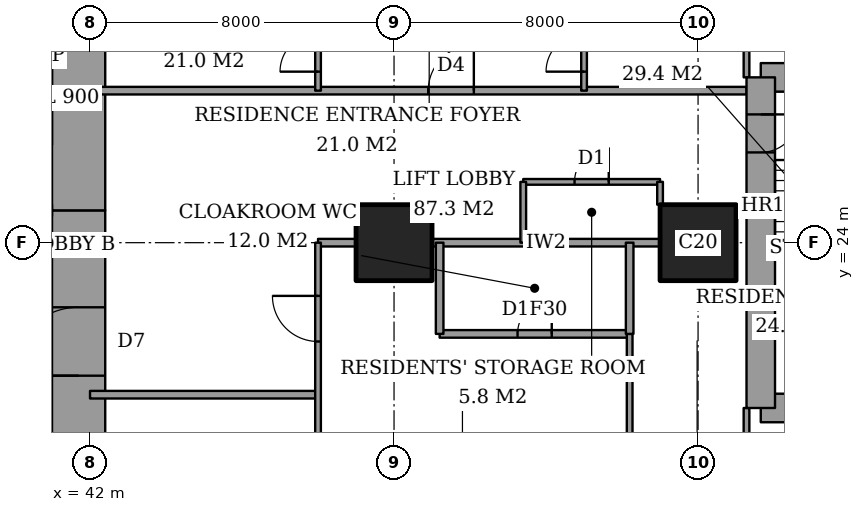
"""IFC4 building model, lengths in metres.
Left out: names, types, materials, properties, quantities, classifications, styles, units other than length and angle.
Written with IfcOpenShell. Run it as: python <this file> out.ifc"""

import sys

from ifc_helpers import new_model, si_unit, direction, frame, frame_2d, origin, origin_2d, place, context, subcontext, project, spatial, rectangle, extrude, element, fill, save


model = new_model("IFC4")
c1 = context("Model", 3, precision=1e-05, world=origin(), true_north=direction((0.0, 1.0)))
c2 = subcontext(c1, "Body", "Model", "MODEL_VIEW")
j1 = project(units=[si_unit("LENGTHUNIT", "METRE"), si_unit("PLANEANGLEUNIT", "RADIAN")], contexts=[c1])
p1 = place(None, origin())
s1 = spatial("IfcSite", under=j1, at=p1, CompositionType="ELEMENT")
p2 = place(p1, origin())
s2 = spatial("IfcBuilding", under=s1, at=p2, CompositionType="ELEMENT")
p3 = place(p2, frame((0.0, 0.0, 103.4)))
s3 = spatial("IfcBuildingStorey", under=s2, at=p3, CompositionType="ELEMENT", Elevation=103.4)
for number, where, z_axis, x_axis in (
    (1, (50.0, 24.0, 0.0), (0.0, 0.0, 1.0), (1.0, 0.0, 0.0)),
    (2, (58.0, 24.0, 0.0), (0.0, 0.0, 1.0), (1.0, 0.0, 0.0)),
):
    element("IfcColumn", number, at=place(p3, frame(where, z_axis=z_axis, x_axis=x_axis)), inside=s3, PredefinedType="COLUMN", context=c2, shape_type="SweptSolid", body=[
        extrude(rectangle(XDim=2.0, YDim=2.0, at=origin_2d()), origin(), (0.0, 0.0, 1.0), 3.6),
    ])
p4 = place(p3, frame((41.7, 13.0, 0.0), z_axis=(0.0, 0.0, 1.0), x_axis=(0.0, 1.0, 0.0)))
e3 = element("IfcWall", 3, at=p4, inside=s3, PredefinedType="SHEAR", context=c2, shape_type="SweptSolid", body=[
    extrude(rectangle(XDim=11.85, YDim=1.4, at=frame_2d((5.925, 0.0))), origin(), (0.0, 0.0, 1.0), 3.6),
])
p5 = place(p4, frame((7.5, 0.0, 0.0)))
e4 = element("IfcOpeningElement", 4, at=p5, cuts=e3, PredefinedType="OPENING", context=c2, shape_type="SweptSolid", body=[
    extrude(rectangle(XDim=1.8, YDim=2.4, at=frame_2d((0.9, 1.2))), frame((0.0, 0.71, 0.0), z_axis=(0.0, -1.0, 0.0), x_axis=(1.0, 0.0, 0.0)), (0.0, 0.0, 1.0), 1.42),
])
p6 = place(p3, frame((41.7, 24.85, 0.0), z_axis=(0.0, 0.0, 1.0), x_axis=(0.0, 1.0, 0.0)))
e5 = element("IfcWall", 5, at=p6, inside=s3, PredefinedType="SHEAR", context=c2, shape_type="SweptSolid", body=[
    extrude(rectangle(XDim=10.15, YDim=1.4, at=frame_2d((5.075, 0.0))), origin(), (0.0, 0.0, 1.0), 3.6),
])
for number, where, z_axis, x_axis in (
    (6, (59.65, 19.65, 0.0), (0.0, 0.0, 1.0), (1.0, 0.0, 0.0)),
    (7, (64.1, 28.35, 0.0), (0.0, 0.0, 1.0), (-1.0, 0.0, 0.0)),
):
    element("IfcWall", number, at=place(p3, frame(where, z_axis=z_axis, x_axis=x_axis)), inside=s3, PredefinedType="SHEAR", context=c2, shape_type="SweptSolid", body=[
        extrude(rectangle(XDim=4.45, YDim=0.75, at=frame_2d((2.225, 0.0))), origin(), (0.0, 0.0, 1.0), 3.6),
    ])
p7 = place(p3, frame((59.65, 28.35, 0.0), z_axis=(0.0, 0.0, 1.0), x_axis=(0.0, -1.0, 0.0)))
e8 = element("IfcWall", 8, at=p7, inside=s3, PredefinedType="SHEAR", context=c2, shape_type="SweptSolid", body=[
    extrude(rectangle(XDim=8.7, YDim=0.75, at=frame_2d((4.35, 0.0))), origin(), (0.0, 0.0, 1.0), 3.6),
])
p8 = place(p7, frame((0.975, 0.0, 0.0)))
e9 = element("IfcOpeningElement", 9, at=p8, cuts=e8, PredefinedType="OPENING", context=c2, shape_type="SweptSolid", body=[
    extrude(rectangle(XDim=1.0, YDim=2.1, at=frame_2d((0.5, 1.05))), frame((0.0, 0.385, 0.0), z_axis=(0.0, -1.0, 0.0), x_axis=(1.0, 0.0, 0.0)), (0.0, 0.0, 1.0), 0.77),
])
p9 = place(p3, frame((42.0, 20.0, 0.0), z_axis=(0.0, 0.0, 1.0), x_axis=(1.0, 0.0, 0.0)))
e10 = element("IfcWall", 10, at=p9, inside=s3, PredefinedType="PARTITIONING", context=c2, shape_type="SweptSolid", body=[
    extrude(rectangle(XDim=6.0, YDim=0.2, at=frame_2d((3.0, 0.0))), origin(), (0.0, 0.0, 1.0), 3.35),
])
p10 = place(p3, frame((51.2, 21.6, 0.0), z_axis=(0.0, 0.0, 1.0), x_axis=(1.0, 0.0, 0.0)))
e11 = element("IfcWall", 11, at=p10, inside=s3, PredefinedType="PARTITIONING", context=c2, shape_type="SweptSolid", body=[
    extrude(rectangle(XDim=5.0, YDim=0.2, at=frame_2d((2.5, 0.0))), origin(), (0.0, 0.0, 1.0), 3.35),
])
p11 = place(p10, frame((2.05, 0.0, 0.0)))
e12 = element("IfcOpeningElement", 12, at=p11, cuts=e11, PredefinedType="OPENING", context=c2, shape_type="SweptSolid", body=[
    extrude(rectangle(XDim=0.9, YDim=2.1, at=frame_2d((0.45, 1.05))), frame((0.0, 0.11, 0.0), z_axis=(0.0, -1.0, 0.0), x_axis=(1.0, 0.0, 0.0)), (0.0, 0.0, 1.0), 0.22),
])
p12 = place(p3, frame((48.0, 24.0, 0.0), z_axis=(0.0, 0.0, 1.0), x_axis=(1.0, 0.0, 0.0)))
e13 = element("IfcWall", 13, at=p12, inside=s3, PredefinedType="PARTITIONING", context=c2, shape_type="SweptSolid", body=[
    extrude(rectangle(XDim=1.0, YDim=0.2, at=frame_2d((0.5, 0.0))), origin(), (0.0, 0.0, 1.0), 3.35),
])
p13 = place(p3, frame((51.0, 24.0, 0.0), z_axis=(0.0, 0.0, 1.0), x_axis=(1.0, 0.0, 0.0)))
e14 = element("IfcWall", 14, at=p13, inside=s3, PredefinedType="PARTITIONING", context=c2, shape_type="SweptSolid", body=[
    extrude(rectangle(XDim=6.0, YDim=0.2, at=frame_2d((3.0, 0.0))), origin(), (0.0, 0.0, 1.0), 3.35),
])
p14 = place(p3, frame((53.4, 25.6, 0.0), z_axis=(0.0, 0.0, 1.0), x_axis=(1.0, 0.0, 0.0)))
e15 = element("IfcWall", 15, at=p14, inside=s3, PredefinedType="PARTITIONING", context=c2, shape_type="SweptSolid", body=[
    extrude(rectangle(XDim=3.6, YDim=0.15, at=frame_2d((1.8, 0.0))), origin(), (0.0, 0.0, 1.0), 3.35),
])
p15 = place(p14, frame((1.35, 0.0, 0.0)))
e16 = element("IfcOpeningElement", 16, at=p15, cuts=e15, PredefinedType="OPENING", context=c2, shape_type="SweptSolid", body=[
    extrude(rectangle(XDim=0.9, YDim=2.1, at=frame_2d((0.45, 1.05))), frame((0.0, 0.085, 0.0), z_axis=(0.0, -1.0, 0.0), x_axis=(1.0, 0.0, 0.0)), (0.0, 0.0, 1.0), 0.17),
])
p16 = place(p3, frame((42.0, 28.0, 0.0), z_axis=(0.0, 0.0, 1.0), x_axis=(1.0, 0.0, 0.0)))
e17 = element("IfcWall", 17, at=p16, inside=s3, PredefinedType="PARTITIONING", context=c2, shape_type="SweptSolid", body=[
    extrude(rectangle(XDim=17.275, YDim=0.2, at=frame_2d((8.637, 0.0))), origin(), (0.0, 0.0, 1.0), 3.35),
])
p17 = place(p16, frame((8.9, 0.0, 0.0)))
e18 = element("IfcOpeningElement", 18, at=p17, cuts=e17, PredefinedType="OPENING", context=c2, shape_type="SweptSolid", body=[
    extrude(rectangle(XDim=1.2, YDim=2.4, at=frame_2d((0.6, 1.2))), frame((0.0, 0.11, 0.0), z_axis=(0.0, -1.0, 0.0), x_axis=(1.0, 0.0, 0.0)), (0.0, 0.0, 1.0), 0.22),
])
p18 = place(p3, frame((48.0, 10.6, 0.0), z_axis=(0.0, 0.0, 1.0), x_axis=(0.0, 1.0, 0.0)))
e19 = element("IfcWall", 19, at=p18, inside=s3, PredefinedType="PARTITIONING", context=c2, shape_type="SweptSolid", body=[
    extrude(rectangle(XDim=13.4, YDim=0.15, at=frame_2d((6.7, 0.0))), origin(), (0.0, 0.0, 1.0), 3.35),
])
p19 = place(p18, frame((10.8, 0.0, 0.0)))
e20 = element("IfcOpeningElement", 20, at=p19, cuts=e19, PredefinedType="OPENING", context=c2, shape_type="SweptSolid", body=[
    extrude(rectangle(XDim=1.2, YDim=2.4, at=frame_2d((0.6, 1.2))), frame((0.0, 0.085, 0.0), z_axis=(0.0, -1.0, 0.0), x_axis=(1.0, 0.0, 0.0)), (0.0, 0.0, 1.0), 0.17),
])
p20 = place(p18, frame((6.7, 0.0, 0.0)))
e21 = element("IfcOpeningElement", 21, at=p20, cuts=e19, PredefinedType="OPENING", context=c2, shape_type="SweptSolid", body=[
    extrude(rectangle(XDim=0.9, YDim=2.1, at=frame_2d((0.45, 1.05))), frame((0.0, 0.085, 0.0), z_axis=(0.0, -1.0, 0.0), x_axis=(1.0, 0.0, 0.0)), (0.0, 0.0, 1.0), 0.17),
])
p21 = place(p3, frame((48.0, 28.0, 0.0), z_axis=(0.0, 0.0, 1.0), x_axis=(0.0, 1.0, 0.0)))
e22 = element("IfcWall", 22, at=p21, inside=s3, PredefinedType="PARTITIONING", context=c2, shape_type="SweptSolid", body=[
    extrude(rectangle(XDim=9.4, YDim=0.15, at=frame_2d((4.7, 0.0))), origin(), (0.0, 0.0, 1.0), 3.35),
])
p22 = place(p21, frame((0.5, 0.0, 0.0)))
e23 = element("IfcOpeningElement", 23, at=p22, cuts=e22, PredefinedType="OPENING", context=c2, shape_type="SweptSolid", body=[
    extrude(rectangle(XDim=1.0, YDim=2.1, at=frame_2d((0.5, 1.05))), frame((0.0, 0.085, 0.0), z_axis=(0.0, -1.0, 0.0), x_axis=(1.0, 0.0, 0.0)), (0.0, 0.0, 1.0), 0.17),
])
p23 = place(p3, frame((51.2, 21.6, 0.0), z_axis=(0.0, 0.0, 1.0), x_axis=(0.0, 1.0, 0.0)))
e24 = element("IfcWall", 24, at=p23, inside=s3, PredefinedType="PARTITIONING", context=c2, shape_type="SweptSolid", body=[
    extrude(rectangle(XDim=2.4, YDim=0.2, at=frame_2d((1.2, 0.0))), origin(), (0.0, 0.0, 1.0), 3.35),
])
p24 = place(p3, frame((53.4, 24.0, 0.0), z_axis=(0.0, 0.0, 1.0), x_axis=(0.0, 1.0, 0.0)))
e25 = element("IfcWall", 25, at=p24, inside=s3, PredefinedType="PARTITIONING", context=c2, shape_type="SweptSolid", body=[
    extrude(rectangle(XDim=1.6, YDim=0.15, at=frame_2d((0.8, 0.0))), origin(), (0.0, 0.0, 1.0), 3.35),
])
p25 = place(p3, frame((55.0, 28.0, 0.0), z_axis=(0.0, 0.0, 1.0), x_axis=(0.0, 1.0, 0.0)))
e26 = element("IfcWall", 26, at=p25, inside=s3, PredefinedType="PARTITIONING", context=c2, shape_type="SweptSolid", body=[
    extrude(rectangle(XDim=9.4, YDim=0.15, at=frame_2d((4.7, 0.0))), origin(), (0.0, 0.0, 1.0), 3.35),
])
p26 = place(p25, frame((0.5, 0.0, 0.0)))
e27 = element("IfcOpeningElement", 27, at=p26, cuts=e26, PredefinedType="OPENING", context=c2, shape_type="SweptSolid", body=[
    extrude(rectangle(XDim=1.0, YDim=2.1, at=frame_2d((0.5, 1.05))), frame((0.0, 0.085, 0.0), z_axis=(0.0, -1.0, 0.0), x_axis=(1.0, 0.0, 0.0)), (0.0, 0.0, 1.0), 0.17),
])
p27 = place(p3, frame((56.2, 21.6, 0.0), z_axis=(0.0, 0.0, 1.0), x_axis=(0.0, 1.0, 0.0)))
e28 = element("IfcWall", 28, at=p27, inside=s3, PredefinedType="PARTITIONING", context=c2, shape_type="SweptSolid", body=[
    extrude(rectangle(XDim=2.4, YDim=0.2, at=frame_2d((1.2, 0.0))), origin(), (0.0, 0.0, 1.0), 3.35),
])
p28 = place(p3, frame((56.2, 10.6, 0.0), z_axis=(0.0, 0.0, 1.0), x_axis=(0.0, 1.0, 0.0)))
e29 = element("IfcWall", 29, at=p28, inside=s3, PredefinedType="PARTITIONING", context=c2, shape_type="SweptSolid", body=[
    extrude(rectangle(XDim=11.0, YDim=0.15, at=frame_2d((5.5, 0.0))), origin(), (0.0, 0.0, 1.0), 3.35),
])
p29 = place(p28, frame((7.0, 0.0, 0.0)))
e30 = element("IfcOpeningElement", 30, at=p29, cuts=e29, PredefinedType="OPENING", context=c2, shape_type="SweptSolid", body=[
    extrude(rectangle(XDim=1.0, YDim=2.1, at=frame_2d((0.5, 1.05))), frame((0.0, 0.085, 0.0), z_axis=(0.0, -1.0, 0.0), x_axis=(1.0, 0.0, 0.0)), (0.0, 0.0, 1.0), 0.17),
])
p30 = place(p3, frame((57.0, 25.0, 0.0), z_axis=(0.0, 0.0, 1.0), x_axis=(0.0, 1.0, 0.0)))
e31 = element("IfcWall", 31, at=p30, inside=s3, PredefinedType="PARTITIONING", context=c2, shape_type="SweptSolid", body=[
    extrude(rectangle(XDim=0.6, YDim=0.15, at=frame_2d((0.3, 0.0))), origin(), (0.0, 0.0, 1.0), 3.35),
])
p31 = place(p3, frame((59.275, 17.2, 0.0), z_axis=(0.0, 0.0, 1.0), x_axis=(0.0, 1.0, 0.0)))
e32 = element("IfcWall", 32, at=p31, inside=s3, PredefinedType="PARTITIONING", context=c2, shape_type="SweptSolid", body=[
    extrude(rectangle(XDim=2.45, YDim=0.15, at=frame_2d((1.225, 0.0))), origin(), (0.0, 0.0, 1.0), 3.35),
])
p32 = place(p31, frame((0.538, 0.0, 0.0)))
e33 = element("IfcOpeningElement", 33, at=p32, cuts=e32, PredefinedType="OPENING", context=c2, shape_type="SweptSolid", body=[
    extrude(rectangle(XDim=1.0, YDim=2.1, at=frame_2d((0.5, 1.05))), frame((0.0, 0.085, 0.0), z_axis=(0.0, -1.0, 0.0), x_axis=(1.0, 0.0, 0.0)), (0.0, 0.0, 1.0), 0.17),
])
p33 = place(p3, frame((59.275, 28.35, 0.0), z_axis=(0.0, 0.0, 1.0), x_axis=(0.0, 1.0, 0.0)))
e34 = element("IfcWall", 34, at=p33, inside=s3, PredefinedType="PARTITIONING", context=c2, shape_type="SweptSolid", body=[
    extrude(rectangle(XDim=2.45, YDim=0.15, at=frame_2d((1.225, 0.0))), origin(), (0.0, 0.0, 1.0), 3.35),
])
p34 = place(p33, frame((0.913, 0.0, 0.0)))
e35 = element("IfcOpeningElement", 35, at=p34, cuts=e34, PredefinedType="OPENING", context=c2, shape_type="SweptSolid", body=[
    extrude(rectangle(XDim=1.0, YDim=2.1, at=frame_2d((0.5, 1.05))), frame((0.0, 0.085, 0.0), z_axis=(0.0, -1.0, 0.0), x_axis=(1.0, 0.0, 0.0)), (0.0, 0.0, 1.0), 0.17),
])
p35 = place(p11, origin())
e36 = element("IfcDoor", 36, at=p35, inside=s3, OperationType="SINGLE_SWING_LEFT", PredefinedType="DOOR", context=c2, shape_type="SweptSolid", body=[
    extrude(rectangle(XDim=0.9, YDim=2.1, at=frame_2d((0.45, 1.05))), frame((0.0, 0.025, 0.0), z_axis=(0.0, -1.0, 0.0), x_axis=(1.0, 0.0, 0.0)), (0.0, 0.0, 1.0), 0.05),
])
fill(e12, e36)
p36 = place(p19, origin())
e37 = element("IfcDoor", 37, at=p36, inside=s3, OperationType="SINGLE_SWING_LEFT", PredefinedType="DOOR", context=c2, shape_type="SweptSolid", body=[
    extrude(rectangle(XDim=1.2, YDim=2.4, at=frame_2d((0.6, 1.2))), frame((0.0, 0.025, 0.0), z_axis=(0.0, -1.0, 0.0), x_axis=(1.0, 0.0, 0.0)), (0.0, 0.0, 1.0), 0.05),
])
fill(e20, e37)
p37 = place(p26, origin())
e38 = element("IfcDoor", 38, at=p37, inside=s3, OperationType="SINGLE_SWING_RIGHT", PredefinedType="DOOR", context=c2, shape_type="SweptSolid", body=[
    extrude(rectangle(XDim=1.0, YDim=2.1, at=frame_2d((0.5, 1.05))), frame((0.0, 0.025, 0.0), z_axis=(0.0, -1.0, 0.0), x_axis=(1.0, 0.0, 0.0)), (0.0, 0.0, 1.0), 0.05),
])
fill(e27, e38)
p38 = place(p17, origin())
e39 = element("IfcDoor", 39, at=p38, inside=s3, OperationType="SINGLE_SWING_LEFT", PredefinedType="DOOR", context=c2, shape_type="SweptSolid", body=[
    extrude(rectangle(XDim=1.2, YDim=2.4, at=frame_2d((0.6, 1.2))), frame((0.0, 0.025, 0.0), z_axis=(0.0, -1.0, 0.0), x_axis=(1.0, 0.0, 0.0)), (0.0, 0.0, 1.0), 0.05),
])
fill(e18, e39)
p39 = place(p22, origin())
e40 = element("IfcDoor", 40, at=p39, inside=s3, OperationType="SINGLE_SWING_RIGHT", PredefinedType="DOOR", context=c2, shape_type="SweptSolid", body=[
    extrude(rectangle(XDim=1.0, YDim=2.1, at=frame_2d((0.5, 1.05))), frame((0.0, 0.025, 0.0), z_axis=(0.0, -1.0, 0.0), x_axis=(1.0, 0.0, 0.0)), (0.0, 0.0, 1.0), 0.05),
])
fill(e23, e40)
p40 = place(p15, origin())
e41 = element("IfcDoor", 41, at=p40, inside=s3, OperationType="SINGLE_SWING_LEFT", PredefinedType="DOOR", context=c2, shape_type="SweptSolid", body=[
    extrude(rectangle(XDim=0.9, YDim=2.1, at=frame_2d((0.45, 1.05))), frame((0.0, 0.025, 0.0), z_axis=(0.0, -1.0, 0.0), x_axis=(1.0, 0.0, 0.0)), (0.0, 0.0, 1.0), 0.05),
])
fill(e16, e41)
p41 = place(p5, origin())
e42 = element("IfcDoor", 42, at=p41, inside=s3, OperationType="DOUBLE_DOOR_DOUBLE_SWING", PredefinedType="DOOR", context=c2, shape_type="SweptSolid", body=[
    extrude(rectangle(XDim=1.8, YDim=2.4, at=frame_2d((0.9, 1.2))), frame((0.0, 0.025, 0.0), z_axis=(0.0, -1.0, 0.0), x_axis=(1.0, 0.0, 0.0)), (0.0, 0.0, 1.0), 0.05),
])
fill(e4, e42)
p42 = place(p8, origin())
e43 = element("IfcDoor", 43, at=p42, inside=s3, OperationType="SINGLE_SWING_RIGHT", PredefinedType="DOOR", context=c2, shape_type="SweptSolid", body=[
    extrude(rectangle(XDim=1.0, YDim=2.1, at=frame_2d((0.5, 1.05))), frame((0.0, 0.025, 0.0), z_axis=(0.0, -1.0, 0.0), x_axis=(1.0, 0.0, 0.0)), (0.0, 0.0, 1.0), 0.05),
])
fill(e9, e43)
save(model, sys.argv[1])
